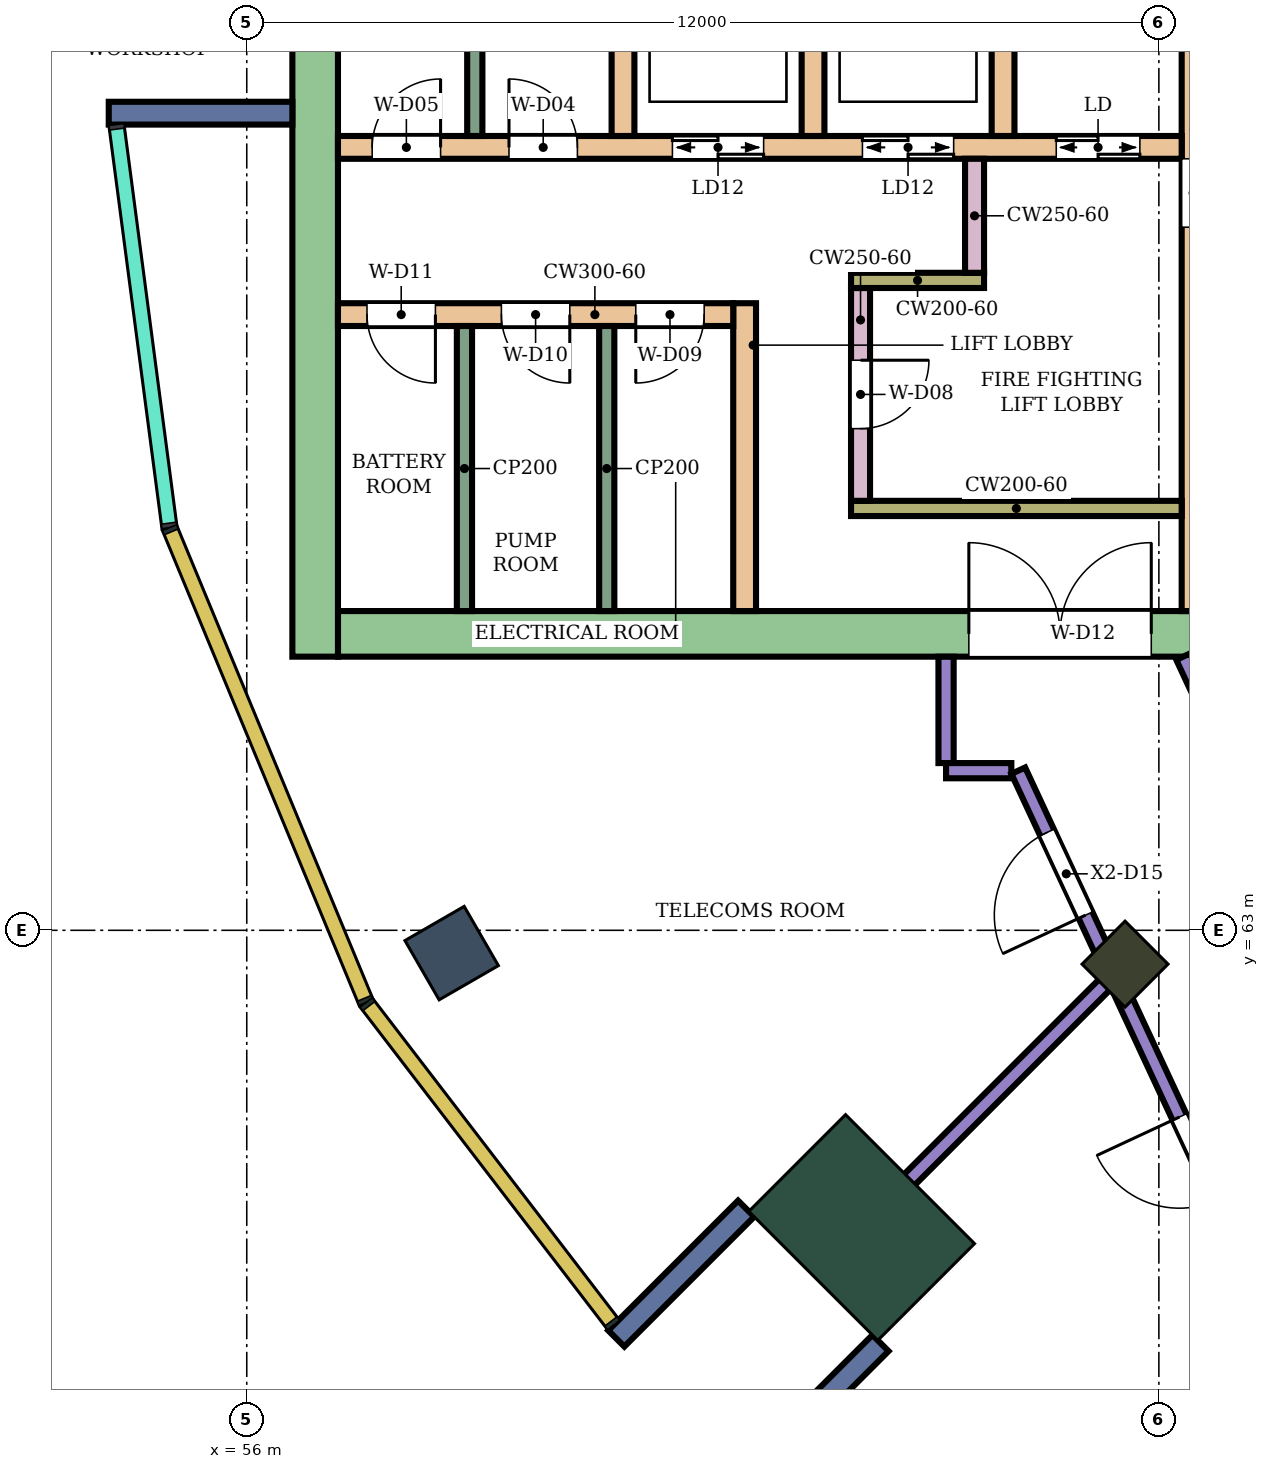
"""IFC4 building model, lengths in metres.
Left out: names, types, materials, properties, quantities, classifications, styles, units other than length and angle.
Written with IfcOpenShell. Run it as: python <this file> out.ifc"""

import sys

from ifc_helpers import new_model, si_unit, direction, frame, frame_2d, origin, origin_2d, place, context, subcontext, project, spatial, rectangle, extrude, element, fill, save


model = new_model("IFC4")
c1 = context("Model", 3, precision=1e-05, world=origin(), true_north=direction((0.0, 1.0)))
c2 = subcontext(c1, "Body", "Model", "MODEL_VIEW")
j1 = project(units=[si_unit("LENGTHUNIT", "METRE"), si_unit("PLANEANGLEUNIT", "RADIAN")], contexts=[c1])
p1 = place(None, origin())
s1 = spatial("IfcSite", under=j1, at=p1, CompositionType="ELEMENT")
p2 = place(p1, origin())
s2 = spatial("IfcBuilding", under=s1, at=p2, CompositionType="ELEMENT")
p3 = place(p2, frame((0.0, 0.0, 206.9)))
s3 = spatial("IfcBuildingStorey", under=s2, at=p3, CompositionType="ELEMENT", Elevation=206.9)
p4 = place(p3, frame((58.696, 62.7, 0.0), z_axis=(0.0, 0.0, 1.0), x_axis=(-0.866025403784, -0.5, 0.0)))
e1 = element("IfcColumn", 1, at=p4, inside=s3, PredefinedType="COLUMN", context=c2, shape_type="SweptSolid", body=[
    extrude(rectangle(XDim=0.9, YDim=0.9, at=origin_2d()), origin(), (0.0, 0.0, 1.0), 5.6),
])
p5 = place(p3, frame((67.555, 62.555, 0.0), z_axis=(0.0, 0.0, 1.0), x_axis=(-0.707106781187, -0.707106781187, 0.0)))
e2 = element("IfcColumn", 2, at=p5, inside=s3, PredefinedType="COLUMN", context=c2, shape_type="SweptSolid", body=[
    extrude(rectangle(XDim=0.8, YDim=0.8, at=origin_2d()), origin(), (0.0, 0.0, 1.0), 5.6),
])
p6 = place(p3, frame((64.09, 59.09, 0.0), z_axis=(0.0, 0.0, 1.0), x_axis=(-0.707106781187, -0.707106781187, 0.0)))
e3 = element("IfcColumn", 3, at=p6, inside=s3, PredefinedType="COLUMN", context=c2, shape_type="SweptSolid", body=[
    extrude(rectangle(XDim=1.8, YDim=2.4, at=origin_2d()), origin(), (0.0, 0.0, 1.0), 5.6),
])
p7 = place(p3, frame((72.1, 66.9, 0.0), z_axis=(0.0, 0.0, 1.0), x_axis=(-1.0, 0.0, 0.0)))
e4 = element("IfcWall", 4, at=p7, inside=s3, PredefinedType="SHEAR", context=c2, shape_type="SweptSolid", body=[
    extrude(rectangle(XDim=14.9, YDim=0.6, at=frame_2d((7.45, 0.0))), origin(), (0.0, 0.0, 1.0), 5.28),
])
p8 = place(p7, frame((4.2, 0.0, 0.0)))
e5 = element("IfcOpeningElement", 5, at=p8, cuts=e4, PredefinedType="OPENING", context=c2, shape_type="SweptSolid", body=[
    extrude(rectangle(XDim=2.4, YDim=2.4, at=frame_2d((1.2, 1.2))), frame((0.0, 0.31, 0.0), z_axis=(0.0, -1.0, 0.0), x_axis=(1.0, 0.0, 0.0)), (0.0, 0.0, 1.0), 0.62),
])
p9 = place(p3, frame((56.9, 83.4, 0.0), z_axis=(0.0, 0.0, 1.0), x_axis=(0.0, -1.0, 0.0)))
e6 = element("IfcWall", 6, at=p9, inside=s3, PredefinedType="SHEAR", context=c2, shape_type="SweptSolid", body=[
    extrude(rectangle(XDim=16.8, YDim=0.6, at=frame_2d((8.4, 0.0))), origin(), (0.0, 0.0, 1.0), 5.28),
])
p10 = place(p3, frame((68.45, 75.0, 0.0), z_axis=(0.0, 0.0, 1.0), x_axis=(0.0, -1.0, 0.0)))
e7 = element("IfcWall", 7, at=p10, inside=s3, PredefinedType="SHEAR", context=c2, shape_type="SweptSolid", body=[
    extrude(rectangle(XDim=7.8, YDim=0.3, at=frame_2d((3.9, 0.0))), origin(), (0.0, 0.0, 1.0), 5.28),
])
p11 = place(p10, frame((1.85, 0.0, 0.0)))
e8 = element("IfcOpeningElement", 8, at=p11, cuts=e7, PredefinedType="OPENING", context=c2, shape_type="SweptSolid", body=[
    extrude(rectangle(XDim=0.9, YDim=2.1, at=frame_2d((0.45, 1.05))), frame((0.0, 0.16, 0.0), z_axis=(0.0, -1.0, 0.0), x_axis=(1.0, 0.0, 0.0)), (0.0, 0.0, 1.0), 0.32),
])
p12 = place(p3, frame((68.3, 73.3, 0.0), z_axis=(0.0, 0.0, 1.0), x_axis=(-1.0, 0.0, 0.0)))
e9 = element("IfcWall", 9, at=p12, inside=s3, PredefinedType="SHEAR", context=c2, shape_type="SweptSolid", body=[
    extrude(rectangle(XDim=11.1, YDim=0.3, at=frame_2d((5.55, 0.0))), origin(), (0.0, 0.0, 1.0), 5.28),
])
p13 = place(p12, frame((0.55, 0.0, 0.0)))
e10 = element("IfcOpeningElement", 10, at=p13, cuts=e9, PredefinedType="OPENING", context=c2, shape_type="SweptSolid", body=[
    extrude(rectangle(XDim=1.1, YDim=2.1, at=frame_2d((0.55, 1.05))), frame((0.0, 0.16, 0.0), z_axis=(0.0, -1.0, 0.0), x_axis=(1.0, 0.0, 0.0)), (0.0, 0.0, 1.0), 0.32),
])
p14 = place(p12, frame((3.0, 0.0, 0.0)))
e11 = element("IfcOpeningElement", 11, at=p14, cuts=e9, PredefinedType="OPENING", context=c2, shape_type="SweptSolid", body=[
    extrude(rectangle(XDim=1.2, YDim=2.1, at=frame_2d((0.6, 1.05))), frame((0.0, 0.16, 0.0), z_axis=(0.0, -1.0, 0.0), x_axis=(1.0, 0.0, 0.0)), (0.0, 0.0, 1.0), 0.32),
])
p15 = place(p12, frame((5.5, 0.0, 0.0)))
e12 = element("IfcOpeningElement", 12, at=p15, cuts=e9, PredefinedType="OPENING", context=c2, shape_type="SweptSolid", body=[
    extrude(rectangle(XDim=1.2, YDim=2.1, at=frame_2d((0.6, 1.05))), frame((0.0, 0.16, 0.0), z_axis=(0.0, -1.0, 0.0), x_axis=(1.0, 0.0, 0.0)), (0.0, 0.0, 1.0), 0.32),
])
p16 = place(p12, frame((7.95, 0.0, 0.0)))
e13 = element("IfcOpeningElement", 13, at=p16, cuts=e9, PredefinedType="OPENING", context=c2, shape_type="SweptSolid", body=[
    extrude(rectangle(XDim=0.9, YDim=2.1, at=frame_2d((0.45, 1.05))), frame((0.0, 0.16, 0.0), z_axis=(0.0, -1.0, 0.0), x_axis=(1.0, 0.0, 0.0)), (0.0, 0.0, 1.0), 0.32),
])
p17 = place(p12, frame((9.75, 0.0, 0.0)))
e14 = element("IfcOpeningElement", 14, at=p17, cuts=e9, PredefinedType="OPENING", context=c2, shape_type="SweptSolid", body=[
    extrude(rectangle(XDim=0.9, YDim=2.1, at=frame_2d((0.45, 1.05))), frame((0.0, 0.16, 0.0), z_axis=(0.0, -1.0, 0.0), x_axis=(1.0, 0.0, 0.0)), (0.0, 0.0, 1.0), 0.32),
])
for number, where, z_axis, x_axis in (
    (15, (65.95, 76.0, 0.0), (0.0, 0.0, 1.0), (0.0, -1.0, 0.0)),
    (16, (63.45, 76.0, 0.0), (0.0, 0.0, 1.0), (0.0, -1.0, 0.0)),
    (17, (60.95, 76.0, 0.0), (0.0, 0.0, 1.0), (0.0, -1.0, 0.0)),
):
    element("IfcWall", number, at=place(p3, frame(where, z_axis=z_axis, x_axis=x_axis)), inside=s3, PredefinedType="SHEAR", context=c2, shape_type="SweptSolid", body=[
        extrude(rectangle(XDim=2.55, YDim=0.3, at=frame_2d((1.275, 0.0))), origin(), (0.0, 0.0, 1.0), 5.28),
    ])
p18 = place(p3, frame((68.3, 68.55, 0.0), z_axis=(0.0, 0.0, 1.0), x_axis=(-1.0, 0.0, 0.0)))
e18 = element("IfcWall", 18, at=p18, inside=s3, PredefinedType="SHEAR", context=c2, shape_type="SweptSolid", body=[
    extrude(rectangle(XDim=4.35, YDim=0.2, at=frame_2d((2.175, 0.0))), origin(), (0.0, 0.0, 1.0), 5.28),
])
p19 = place(p3, frame((64.075, 71.45, 0.0), z_axis=(0.0, 0.0, 1.0), x_axis=(0.0, -1.0, 0.0)))
e19 = element("IfcWall", 19, at=p19, inside=s3, PredefinedType="SHEAR", context=c2, shape_type="SweptSolid", body=[
    extrude(rectangle(XDim=2.8, YDim=0.25, at=frame_2d((1.4, 0.0))), origin(), (0.0, 0.0, 1.0), 5.28),
])
p20 = place(p19, frame((0.95, 0.0, 0.0)))
e20 = element("IfcOpeningElement", 20, at=p20, cuts=e19, PredefinedType="OPENING", context=c2, shape_type="SweptSolid", body=[
    extrude(rectangle(XDim=0.9, YDim=2.1, at=frame_2d((0.45, 1.05))), frame((0.0, 0.135, 0.0), z_axis=(0.0, -1.0, 0.0), x_axis=(1.0, 0.0, 0.0)), (0.0, 0.0, 1.0), 0.27),
])
p21 = place(p3, frame((65.7, 71.55, 0.0), z_axis=(0.0, 0.0, 1.0), x_axis=(-1.0, 0.0, 0.0)))
e21 = element("IfcWall", 21, at=p21, inside=s3, PredefinedType="SHEAR", context=c2, shape_type="SweptSolid", body=[
    extrude(rectangle(XDim=1.75, YDim=0.2, at=frame_2d((0.875, 0.0))), origin(), (0.0, 0.0, 1.0), 5.28),
])
p22 = place(p3, frame((65.575, 73.15, 0.0), z_axis=(0.0, 0.0, 1.0), x_axis=(0.0, -1.0, 0.0)))
e22 = element("IfcWall", 22, at=p22, inside=s3, PredefinedType="SHEAR", context=c2, shape_type="SweptSolid", body=[
    extrude(rectangle(XDim=1.5, YDim=0.25, at=frame_2d((0.75, 0.0))), origin(), (0.0, 0.0, 1.0), 5.28),
])
p23 = place(p3, frame((62.55, 71.25, 0.0), z_axis=(0.0, 0.0, 1.0), x_axis=(0.0, -1.0, 0.0)))
e23 = element("IfcWall", 23, at=p23, inside=s3, PredefinedType="SHEAR", context=c2, shape_type="SweptSolid", body=[
    extrude(rectangle(XDim=4.05, YDim=0.3, at=frame_2d((2.025, 0.0))), origin(), (0.0, 0.0, 1.0), 5.28),
])
p24 = place(p3, frame((62.4, 71.1, 0.0), z_axis=(0.0, 0.0, 1.0), x_axis=(-1.0, 0.0, 0.0)))
e24 = element("IfcWall", 24, at=p24, inside=s3, PredefinedType="SHEAR", context=c2, shape_type="SweptSolid", body=[
    extrude(rectangle(XDim=5.2, YDim=0.3, at=frame_2d((2.6, 0.0))), origin(), (0.0, 0.0, 1.0), 5.28),
])
p25 = place(p24, frame((0.382, 0.0, 0.0)))
e25 = element("IfcOpeningElement", 25, at=p25, cuts=e24, PredefinedType="OPENING", context=c2, shape_type="SweptSolid", body=[
    extrude(rectangle(XDim=0.9, YDim=2.1, at=frame_2d((0.45, 1.05))), frame((0.0, 0.16, 0.0), z_axis=(0.0, -1.0, 0.0), x_axis=(1.0, 0.0, 0.0)), (0.0, 0.0, 1.0), 0.32),
])
p26 = place(p24, frame((2.15, 0.0, 0.0)))
e26 = element("IfcOpeningElement", 26, at=p26, cuts=e24, PredefinedType="OPENING", context=c2, shape_type="SweptSolid", body=[
    extrude(rectangle(XDim=0.9, YDim=2.1, at=frame_2d((0.45, 1.05))), frame((0.0, 0.16, 0.0), z_axis=(0.0, -1.0, 0.0), x_axis=(1.0, 0.0, 0.0)), (0.0, 0.0, 1.0), 0.32),
])
p27 = place(p24, frame((3.918, 0.0, 0.0)))
e27 = element("IfcOpeningElement", 27, at=p27, cuts=e24, PredefinedType="OPENING", context=c2, shape_type="SweptSolid", body=[
    extrude(rectangle(XDim=0.9, YDim=2.1, at=frame_2d((0.45, 1.05))), frame((0.0, 0.16, 0.0), z_axis=(0.0, -1.0, 0.0), x_axis=(1.0, 0.0, 0.0)), (0.0, 0.0, 1.0), 0.32),
])
for number, where, z_axis, x_axis in (
    (28, (56.6, 73.75, 0.0), (0.0, 0.0, 1.0), (-1.0, 0.0, 0.0)),
    (29, (62.57, 59.338, 0.0), (0.0, 0.0, 1.0), (-0.707, -0.707, 0.0)),
    (30, (64.338, 57.57, 0.0), (0.0, 0.0, 1.0), (-0.707, -0.707, 0.0)),
):
    element("IfcWall", number, at=place(p3, frame(where, z_axis=z_axis, x_axis=x_axis)), inside=s3, PredefinedType="NOTDEFINED", context=c2, shape_type="SweptSolid", body=[
        extrude(rectangle(XDim=2.416, YDim=0.3, at=frame_2d((1.208, 0.0))), origin(), (0.0, 0.0, 1.0), 5.6),
    ])
p28 = place(p3, frame((63.595, 58.596, 0.0), z_axis=(0.0, 0.0, 1.0), x_axis=(0.707106781187, 0.707106781187, 0.0)))
e31 = element("IfcWall", 31, at=p28, inside=s3, PredefinedType="PARTITIONING", context=c2, shape_type="SweptSolid", body=[
    extrude(rectangle(XDim=5.247, YDim=0.2, at=frame_2d((2.624, 0.0))), origin(), (0.0, 0.0, 1.0), 5.15),
])
p29 = place(p3, frame((65.2, 65.2, 0.0), z_axis=(0.0, 0.0, 1.0), x_axis=(0.0, 1.0, 0.0)))
e32 = element("IfcWall", 32, at=p29, inside=s3, PredefinedType="PARTITIONING", context=c2, shape_type="SweptSolid", body=[
    extrude(rectangle(XDim=1.399, YDim=0.2, at=frame_2d((0.7, 0.0))), origin(), (0.0, 0.0, 1.0), 5.15),
])
p30 = place(p3, frame((65.2, 65.1, 0.0), z_axis=(0.0, 0.0, 1.0), x_axis=(1.0, 0.0, 0.0)))
e33 = element("IfcWall", 33, at=p30, inside=s3, PredefinedType="PARTITIONING", context=c2, shape_type="SweptSolid", body=[
    extrude(rectangle(XDim=0.859, YDim=0.2, at=frame_2d((0.43, 0.0))), origin(), (0.0, 0.0, 1.0), 5.15),
])
p31 = place(p3, frame((66.15, 65.1, 0.0), z_axis=(0.0, 0.0, 1.0), x_axis=(0.421948011018, -0.906620028456, 0.0)))
e34 = element("IfcWall", 34, at=p31, inside=s3, PredefinedType="PARTITIONING", context=c2, shape_type="SweptSolid", body=[
    extrude(rectangle(XDim=8.228, YDim=0.2, at=frame_2d((4.114, 0.0))), origin(), (0.0, 0.0, 1.0), 5.15),
])
p32 = place(p31, frame((5.025, 0.0, 0.0)))
e35 = element("IfcOpeningElement", 35, at=p32, cuts=e34, PredefinedType="OPENING", context=c2, shape_type="SweptSolid", body=[
    extrude(rectangle(XDim=1.2, YDim=2.4, at=frame_2d((0.6, 1.2))), frame((0.0, 0.11, 0.0), z_axis=(0.0, -1.0, 0.0), x_axis=(1.0, 0.0, 0.0)), (0.0, 0.0, 1.0), 0.22),
])
p33 = place(p31, frame((0.897, 0.0, 0.0)))
e36 = element("IfcOpeningElement", 36, at=p33, cuts=e34, PredefinedType="OPENING", context=c2, shape_type="SweptSolid", body=[
    extrude(rectangle(XDim=1.2, YDim=2.4, at=frame_2d((0.6, 1.2))), frame((0.0, 0.11, 0.0), z_axis=(0.0, -1.0, 0.0), x_axis=(1.0, 0.0, 0.0)), (0.0, 0.0, 1.0), 0.22),
])
p34 = place(p3, frame((67.1, 52.659, 0.0), z_axis=(0.0, 0.0, 1.0), x_axis=(0.500021123982, 0.866013207504, 0.0)))
e37 = element("IfcWall", 37, at=p34, inside=s3, PredefinedType="PARTITIONING", context=c2, shape_type="SweptSolid", body=[
    extrude(rectangle(XDim=5.472, YDim=0.2, at=frame_2d((2.736, 0.0))), origin(), (0.0, 0.0, 1.0), 4.667),
])
p35 = place(p3, frame((68.32, 66.6, 0.0), z_axis=(0.0, 0.0, 1.0), x_axis=(0.422061116547, -0.90656737968, 0.0)))
e38 = element("IfcWall", 38, at=p35, inside=s3, PredefinedType="PARTITIONING", context=c2, shape_type="SweptSolid", body=[
    extrude(rectangle(XDim=7.46, YDim=0.2, at=frame_2d((3.73, 0.0))), origin(), (0.0, 0.0, 1.0), 5.15),
])
p36 = place(p35, frame((3.022, 0.0, 0.0)))
e39 = element("IfcOpeningElement", 39, at=p36, cuts=e38, PredefinedType="OPENING", context=c2, shape_type="SweptSolid", body=[
    extrude(rectangle(XDim=1.2, YDim=2.4, at=frame_2d((0.6, 1.2))), frame((0.0, 0.11, 0.0), z_axis=(0.0, -1.0, 0.0), x_axis=(1.0, 0.0, 0.0)), (0.0, 0.0, 1.0), 0.22),
])
p37 = place(p3, frame((59.0, 76.0, 0.0), z_axis=(0.0, 0.0, 1.0), x_axis=(0.0, -1.0, 0.0)))
e40 = element("IfcWall", 40, at=p37, inside=s3, PredefinedType="PARTITIONING", context=c2, shape_type="SweptSolid", body=[
    extrude(rectangle(XDim=2.55, YDim=0.2, at=frame_2d((1.275, 0.0))), origin(), (0.0, 0.0, 1.0), 5.28),
])
for number, where, z_axis, x_axis in (
    (41, (60.736, 70.95, 0.0), (0.0, 0.0, 1.0), (0.0, -1.0, 0.0)),
    (42, (58.864, 70.95, 0.0), (0.0, 0.0, 1.0), (0.0, -1.0, 0.0)),
):
    element("IfcWall", number, at=place(p3, frame(where, z_axis=z_axis, x_axis=x_axis)), inside=s3, PredefinedType="PARTITIONING", context=c2, shape_type="SweptSolid", body=[
        extrude(rectangle(XDim=3.75, YDim=0.2, at=frame_2d((1.875, 0.0))), origin(), (0.0, 0.0, 1.0), 5.28),
    ])
p38 = place(p32, frame((1.2, 0.0, 0.0), z_axis=(0.0, 0.0, 1.0), x_axis=(-1.0, 0.0, 0.0)))
e43 = element("IfcDoor", 43, at=p38, inside=s3, OperationType="SINGLE_SWING_RIGHT", PredefinedType="DOOR", context=c2, shape_type="SweptSolid", body=[
    extrude(rectangle(XDim=1.2, YDim=2.4, at=frame_2d((0.6, 1.2))), frame((0.0, 0.025, 0.0), z_axis=(0.0, -1.0, 0.0), x_axis=(1.0, 0.0, 0.0)), (0.0, 0.0, 1.0), 0.05),
])
fill(e35, e43)
p39 = place(p33, frame((1.2, 0.0, 0.0), z_axis=(0.0, 0.0, 1.0), x_axis=(-1.0, 0.0, 0.0)))
e44 = element("IfcDoor", 44, at=p39, inside=s3, OperationType="SINGLE_SWING_LEFT", PredefinedType="DOOR", context=c2, shape_type="SweptSolid", body=[
    extrude(rectangle(XDim=1.2, YDim=2.4, at=frame_2d((0.6, 1.2))), frame((0.0, 0.025, 0.0), z_axis=(0.0, -1.0, 0.0), x_axis=(1.0, 0.0, 0.0)), (0.0, 0.0, 1.0), 0.05),
])
fill(e36, e44)
p40 = place(p13, origin())
e45 = element("IfcDoor", 45, at=p40, inside=s3, OperationType="DOUBLE_DOOR_SLIDING", PredefinedType="DOOR", context=c2, shape_type="SweptSolid", body=[
    extrude(rectangle(XDim=1.1, YDim=2.1, at=frame_2d((0.55, 1.05))), frame((0.0, 0.025, 0.0), z_axis=(0.0, -1.0, 0.0), x_axis=(1.0, 0.0, 0.0)), (0.0, 0.0, 1.0), 0.05),
])
fill(e10, e45)
p41 = place(p14, origin())
e46 = element("IfcDoor", 46, at=p41, inside=s3, OperationType="DOUBLE_DOOR_SLIDING", PredefinedType="DOOR", context=c2, shape_type="SweptSolid", body=[
    extrude(rectangle(XDim=1.2, YDim=2.1, at=frame_2d((0.6, 1.05))), frame((0.0, 0.025, 0.0), z_axis=(0.0, -1.0, 0.0), x_axis=(1.0, 0.0, 0.0)), (0.0, 0.0, 1.0), 0.05),
])
fill(e11, e46)
p42 = place(p15, origin())
e47 = element("IfcDoor", 47, at=p42, inside=s3, OperationType="DOUBLE_DOOR_SLIDING", PredefinedType="DOOR", context=c2, shape_type="SweptSolid", body=[
    extrude(rectangle(XDim=1.2, YDim=2.1, at=frame_2d((0.6, 1.05))), frame((0.0, 0.025, 0.0), z_axis=(0.0, -1.0, 0.0), x_axis=(1.0, 0.0, 0.0)), (0.0, 0.0, 1.0), 0.05),
])
fill(e12, e47)
p43 = place(p16, frame((0.9, 0.0, 0.0), z_axis=(0.0, 0.0, 1.0), x_axis=(-1.0, 0.0, 0.0)))
e48 = element("IfcDoor", 48, at=p43, inside=s3, OperationType="SINGLE_SWING_LEFT", PredefinedType="DOOR", context=c2, shape_type="SweptSolid", body=[
    extrude(rectangle(XDim=0.9, YDim=2.1, at=frame_2d((0.45, 1.05))), frame((0.0, 0.025, 0.0), z_axis=(0.0, -1.0, 0.0), x_axis=(1.0, 0.0, 0.0)), (0.0, 0.0, 1.0), 0.05),
])
fill(e13, e48)
p44 = place(p17, frame((0.9, 0.0, 0.0), z_axis=(0.0, 0.0, 1.0), x_axis=(-1.0, 0.0, 0.0)))
e49 = element("IfcDoor", 49, at=p44, inside=s3, OperationType="SINGLE_SWING_RIGHT", PredefinedType="DOOR", context=c2, shape_type="SweptSolid", body=[
    extrude(rectangle(XDim=0.9, YDim=2.1, at=frame_2d((0.45, 1.05))), frame((0.0, 0.025, 0.0), z_axis=(0.0, -1.0, 0.0), x_axis=(1.0, 0.0, 0.0)), (0.0, 0.0, 1.0), 0.05),
])
fill(e14, e49)
p45 = place(p20, origin())
e50 = element("IfcDoor", 50, at=p45, inside=s3, OperationType="SINGLE_SWING_LEFT", PredefinedType="DOOR", context=c2, shape_type="SweptSolid", body=[
    extrude(rectangle(XDim=0.9, YDim=2.1, at=frame_2d((0.45, 1.05))), frame((0.0, 0.025, 0.0), z_axis=(0.0, -1.0, 0.0), x_axis=(1.0, 0.0, 0.0)), (0.0, 0.0, 1.0), 0.05),
])
fill(e20, e50)
p46 = place(p25, origin())
e51 = element("IfcDoor", 51, at=p46, inside=s3, OperationType="SINGLE_SWING_RIGHT", PredefinedType="DOOR", context=c2, shape_type="SweptSolid", body=[
    extrude(rectangle(XDim=0.9, YDim=2.1, at=frame_2d((0.45, 1.05))), frame((0.0, 0.025, 0.0), z_axis=(0.0, -1.0, 0.0), x_axis=(1.0, 0.0, 0.0)), (0.0, 0.0, 1.0), 0.05),
])
fill(e25, e51)
p47 = place(p26, origin())
e52 = element("IfcDoor", 52, at=p47, inside=s3, OperationType="SINGLE_SWING_LEFT", PredefinedType="DOOR", context=c2, shape_type="SweptSolid", body=[
    extrude(rectangle(XDim=0.9, YDim=2.1, at=frame_2d((0.45, 1.05))), frame((0.0, 0.025, 0.0), z_axis=(0.0, -1.0, 0.0), x_axis=(1.0, 0.0, 0.0)), (0.0, 0.0, 1.0), 0.05),
])
fill(e26, e52)
p48 = place(p27, origin())
e53 = element("IfcDoor", 53, at=p48, inside=s3, OperationType="SINGLE_SWING_LEFT", PredefinedType="DOOR", context=c2, shape_type="SweptSolid", body=[
    extrude(rectangle(XDim=0.9, YDim=2.1, at=frame_2d((0.45, 1.05))), frame((0.0, 0.025, 0.0), z_axis=(0.0, -1.0, 0.0), x_axis=(1.0, 0.0, 0.0)), (0.0, 0.0, 1.0), 0.05),
])
fill(e27, e53)
p49 = place(p8, frame((2.4, 0.0, 0.0), z_axis=(0.0, 0.0, 1.0), x_axis=(-1.0, 0.0, 0.0)))
e54 = element("IfcDoor", 54, at=p49, inside=s3, OperationType="DOUBLE_DOOR_SINGLE_SWING", PredefinedType="DOOR", context=c2, shape_type="SweptSolid", body=[
    extrude(rectangle(XDim=2.4, YDim=2.4, at=frame_2d((1.2, 1.2))), frame((0.0, 0.025, 0.0), z_axis=(0.0, -1.0, 0.0), x_axis=(1.0, 0.0, 0.0)), (0.0, 0.0, 1.0), 0.05),
])
fill(e5, e54)
save(model, sys.argv[1])
